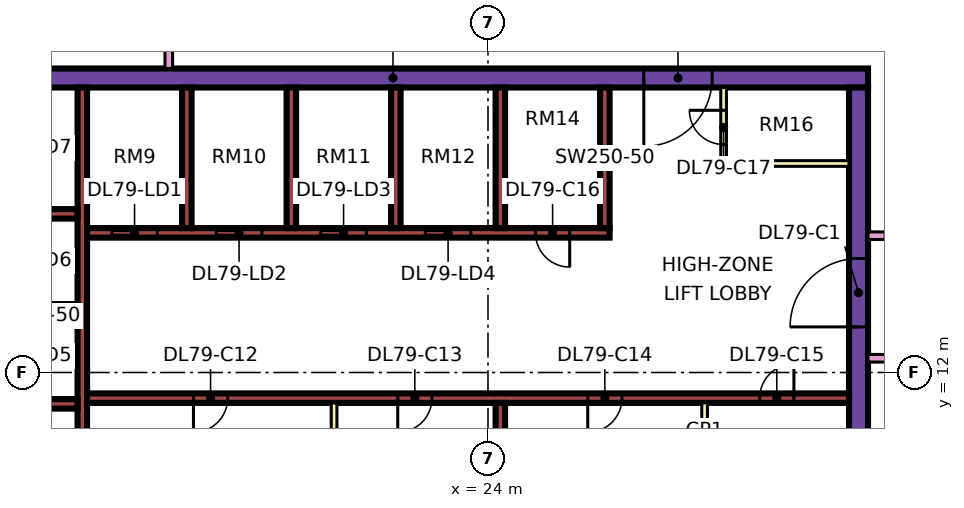
"""IFC4 building model, lengths in metres.
Left out: names, types, materials, properties, quantities, classifications, styles, units other than length and angle.
Written with IfcOpenShell. Run it as: python <this file> out.ifc"""

import sys

from ifc_helpers import new_model, si_unit, direction, frame, frame_2d, origin, place, context, subcontext, project, spatial, rectangle, extrude, element, fill, save


model = new_model("IFC4")
c1 = context("Model", 3, precision=1e-05, world=origin(), true_north=direction((0.0, 1.0)))
c2 = subcontext(c1, "Body", "Model", "MODEL_VIEW")
j1 = project(units=[si_unit("LENGTHUNIT", "METRE"), si_unit("PLANEANGLEUNIT", "RADIAN")], contexts=[c1])
p1 = place(None, origin())
s1 = spatial("IfcSite", under=j1, at=p1, CompositionType="ELEMENT")
p2 = place(p1, origin())
s2 = spatial("IfcBuilding", under=s1, at=p2, CompositionType="ELEMENT")
p3 = place(p2, frame((0.0, 0.0, 342.65)))
s3 = spatial("IfcBuildingStorey", under=s2, at=p3, CompositionType="ELEMENT", Elevation=342.65)
p4 = place(p3, frame((9.0, 19.75, 0.0), z_axis=(0.0, 0.0, 1.0), x_axis=(1.0, 0.0, 0.0)))
e1 = element("IfcWall", 1, at=p4, inside=s3, PredefinedType="SHEAR", context=c2, shape_type="SweptSolid", body=[
    extrude(rectangle(XDim=25.0, YDim=0.5, at=frame_2d((12.5, 0.0))), origin(), (0.0, 0.0, 1.0), 3.75),
])
p5 = place(p4, frame((19.1, 0.0, 0.0)))
e2 = element("IfcOpeningElement", 2, at=p5, cuts=e1, PredefinedType="OPENING", context=c2, shape_type="SweptSolid", body=[
    extrude(rectangle(XDim=1.8, YDim=2.4, at=frame_2d((0.9, 1.2))), frame((0.0, 0.26, 0.0), z_axis=(0.0, -1.0, 0.0), x_axis=(1.0, 0.0, 0.0)), (0.0, 0.0, 1.0), 0.52),
])
p6 = place(p3, frame((33.75, 7.5, 0.0), z_axis=(0.0, 0.0, 1.0), x_axis=(0.0, 1.0, 0.0)))
e3 = element("IfcWall", 3, at=p6, inside=s3, PredefinedType="SHEAR", context=c2, shape_type="SweptSolid", body=[
    extrude(rectangle(XDim=12.0, YDim=0.5, at=frame_2d((6.0, 0.0))), origin(), (0.0, 0.0, 1.0), 3.75),
])
p7 = place(p6, frame((5.7, 0.0, 0.0)))
e4 = element("IfcOpeningElement", 4, at=p7, cuts=e3, PredefinedType="OPENING", context=c2, shape_type="SweptSolid", body=[
    extrude(rectangle(XDim=1.8, YDim=2.4, at=frame_2d((0.9, 1.2))), frame((0.0, 0.26, 0.0), z_axis=(0.0, -1.0, 0.0), x_axis=(1.0, 0.0, 0.0)), (0.0, 0.0, 1.0), 0.52),
])
p8 = place(p3, frame((13.325, 7.5, 0.0), z_axis=(0.0, 0.0, 1.0), x_axis=(0.0, 1.0, 0.0)))
e5 = element("IfcWall", 5, at=p8, inside=s3, PredefinedType="SHEAR", context=c2, shape_type="SweptSolid", body=[
    extrude(rectangle(XDim=12.0, YDim=0.25, at=frame_2d((6.0, 0.0))), origin(), (0.0, 0.0, 1.0), 3.75),
])
p9 = place(p3, frame((13.45, 11.325, 0.0), z_axis=(0.0, 0.0, 1.0), x_axis=(1.0, 0.0, 0.0)))
e6 = element("IfcWall", 6, at=p9, inside=s3, PredefinedType="SHEAR", context=c2, shape_type="SweptSolid", body=[
    extrude(rectangle(XDim=20.05, YDim=0.25, at=frame_2d((10.025, 0.0))), origin(), (0.0, 0.0, 1.0), 3.75),
])
p10 = place(p9, frame((2.8, 0.0, 0.0)))
e7 = element("IfcOpeningElement", 7, at=p10, cuts=e6, PredefinedType="OPENING", context=c2, shape_type="SweptSolid", body=[
    extrude(rectangle(XDim=0.9, YDim=2.1, at=frame_2d((0.45, 1.05))), frame((0.0, 0.135, 0.0), z_axis=(0.0, -1.0, 0.0), x_axis=(1.0, 0.0, 0.0)), (0.0, 0.0, 1.0), 0.27),
])
p11 = place(p9, frame((8.175, 0.0, 0.0)))
e8 = element("IfcOpeningElement", 8, at=p11, cuts=e6, PredefinedType="OPENING", context=c2, shape_type="SweptSolid", body=[
    extrude(rectangle(XDim=0.9, YDim=2.1, at=frame_2d((0.45, 1.05))), frame((0.0, 0.135, 0.0), z_axis=(0.0, -1.0, 0.0), x_axis=(1.0, 0.0, 0.0)), (0.0, 0.0, 1.0), 0.27),
])
p12 = place(p9, frame((13.175, 0.0, 0.0)))
e9 = element("IfcOpeningElement", 9, at=p12, cuts=e6, PredefinedType="OPENING", context=c2, shape_type="SweptSolid", body=[
    extrude(rectangle(XDim=0.9, YDim=2.1, at=frame_2d((0.45, 1.05))), frame((0.0, 0.135, 0.0), z_axis=(0.0, -1.0, 0.0), x_axis=(1.0, 0.0, 0.0)), (0.0, 0.0, 1.0), 0.27),
])
p13 = place(p9, frame((17.7, 0.0, 0.0)))
e10 = element("IfcOpeningElement", 10, at=p13, cuts=e6, PredefinedType="OPENING", context=c2, shape_type="SweptSolid", body=[
    extrude(rectangle(XDim=0.9, YDim=2.1, at=frame_2d((0.45, 1.05))), frame((0.0, 0.135, 0.0), z_axis=(0.0, -1.0, 0.0), x_axis=(1.0, 0.0, 0.0)), (0.0, 0.0, 1.0), 0.27),
])
p14 = place(p3, frame((13.45, 15.675, 0.0), z_axis=(0.0, 0.0, 1.0), x_axis=(1.0, 0.0, 0.0)))
e11 = element("IfcWall", 11, at=p14, inside=s3, PredefinedType="SHEAR", context=c2, shape_type="SweptSolid", body=[
    extrude(rectangle(XDim=13.75, YDim=0.25, at=frame_2d((6.875, 0.0))), origin(), (0.0, 0.0, 1.0), 3.75),
])
p15 = place(p14, frame((0.65, 0.0, 0.0)))
e12 = element("IfcOpeningElement", 12, at=p15, cuts=e11, PredefinedType="OPENING", context=c2, shape_type="SweptSolid", body=[
    extrude(rectangle(XDim=1.2, YDim=2.2, at=frame_2d((0.6, 1.1))), frame((0.0, 0.135, 0.0), z_axis=(0.0, -1.0, 0.0), x_axis=(1.0, 0.0, 0.0)), (0.0, 0.0, 1.0), 0.27),
])
p16 = place(p14, frame((3.4, 0.0, 0.0)))
e13 = element("IfcOpeningElement", 13, at=p16, cuts=e11, PredefinedType="OPENING", context=c2, shape_type="SweptSolid", body=[
    extrude(rectangle(XDim=1.2, YDim=2.2, at=frame_2d((0.6, 1.1))), frame((0.0, 0.135, 0.0), z_axis=(0.0, -1.0, 0.0), x_axis=(1.0, 0.0, 0.0)), (0.0, 0.0, 1.0), 0.27),
])
p17 = place(p14, frame((6.15, 0.0, 0.0)))
e14 = element("IfcOpeningElement", 14, at=p17, cuts=e11, PredefinedType="OPENING", context=c2, shape_type="SweptSolid", body=[
    extrude(rectangle(XDim=1.2, YDim=2.2, at=frame_2d((0.6, 1.1))), frame((0.0, 0.135, 0.0), z_axis=(0.0, -1.0, 0.0), x_axis=(1.0, 0.0, 0.0)), (0.0, 0.0, 1.0), 0.27),
])
p18 = place(p14, frame((8.9, 0.0, 0.0)))
e15 = element("IfcOpeningElement", 15, at=p18, cuts=e11, PredefinedType="OPENING", context=c2, shape_type="SweptSolid", body=[
    extrude(rectangle(XDim=1.2, YDim=2.2, at=frame_2d((0.6, 1.1))), frame((0.0, 0.135, 0.0), z_axis=(0.0, -1.0, 0.0), x_axis=(1.0, 0.0, 0.0)), (0.0, 0.0, 1.0), 0.27),
])
p19 = place(p14, frame((11.8, 0.0, 0.0)))
e16 = element("IfcOpeningElement", 16, at=p19, cuts=e11, PredefinedType="OPENING", context=c2, shape_type="SweptSolid", body=[
    extrude(rectangle(XDim=0.9, YDim=2.1, at=frame_2d((0.45, 1.05))), frame((0.0, 0.135, 0.0), z_axis=(0.0, -1.0, 0.0), x_axis=(1.0, 0.0, 0.0)), (0.0, 0.0, 1.0), 0.27),
])
for number, where, z_axis, x_axis in (
    (17, (10.2, 11.175, 0.0), (0.0, 0.0, 1.0), (1.0, 0.0, 0.0)),
    (18, (10.2, 13.675, 0.0), (0.0, 0.0, 1.0), (1.0, 0.0, 0.0)),
    (19, (10.2, 16.175, 0.0), (0.0, 0.0, 1.0), (1.0, 0.0, 0.0)),
):
    element("IfcWall", number, at=place(p3, frame(where, z_axis=z_axis, x_axis=x_axis)), inside=s3, PredefinedType="SHEAR", context=c2, shape_type="SweptSolid", body=[
        extrude(rectangle(XDim=3.0, YDim=0.25, at=frame_2d((1.5, 0.0))), origin(), (0.0, 0.0, 1.0), 3.75),
    ])
for number, where, z_axis, x_axis in (
    (20, (24.325, 7.5, 0.0), (0.0, 0.0, 1.0), (0.0, 1.0, 0.0)),
    (21, (16.075, 15.8, 0.0), (0.0, 0.0, 1.0), (0.0, 1.0, 0.0)),
    (22, (18.825, 15.8, 0.0), (0.0, 0.0, 1.0), (0.0, 1.0, 0.0)),
    (23, (21.575, 15.8, 0.0), (0.0, 0.0, 1.0), (0.0, 1.0, 0.0)),
    (24, (24.325, 15.8, 0.0), (0.0, 0.0, 1.0), (0.0, 1.0, 0.0)),
    (25, (27.075, 15.8, 0.0), (0.0, 0.0, 1.0), (0.0, 1.0, 0.0)),
):
    element("IfcWall", number, at=place(p3, frame(where, z_axis=z_axis, x_axis=x_axis)), inside=s3, PredefinedType="SHEAR", context=c2, shape_type="SweptSolid", body=[
        extrude(rectangle(XDim=3.7, YDim=0.25, at=frame_2d((1.85, 0.0))), origin(), (0.0, 0.0, 1.0), 3.75),
    ])
p20 = place(p3, frame((-1.447, 12.553, 0.0), z_axis=(0.0, 0.0, 1.0), x_axis=(0.707106781187, -0.707106781187, 0.0)))
e26 = element("IfcWall", 26, at=p20, inside=s3, PredefinedType="SOLIDWALL", context=c2, shape_type="SweptSolid", body=[
    extrude(rectangle(XDim=19.799, YDim=0.15, at=frame_2d((9.899, 0.0))), origin(), (0.0, 0.0, 1.0), 3.35),
])
p21 = place(p20, frame((2.212, 0.0, 0.45)))
e27 = element("IfcOpeningElement", 27, at=p21, cuts=e26, PredefinedType="OPENING", context=c2, shape_type="SweptSolid", body=[
    extrude(rectangle(XDim=3.0, YDim=2.4, at=frame_2d((1.5, 1.2))), frame((0.0, 0.085, 0.0), z_axis=(0.0, -1.0, 0.0), x_axis=(1.0, 0.0, 0.0)), (0.0, 0.0, 1.0), 0.17),
])
p22 = place(p20, frame((10.216, 0.0, 0.45)))
e28 = element("IfcOpeningElement", 28, at=p22, cuts=e26, PredefinedType="OPENING", context=c2, shape_type="SweptSolid", body=[
    extrude(rectangle(XDim=3.0, YDim=2.4, at=frame_2d((1.5, 1.2))), frame((0.0, 0.085, 0.0), z_axis=(0.0, -1.0, 0.0), x_axis=(1.0, 0.0, 0.0)), (0.0, 0.0, 1.0), 0.17),
])
for number, where, z_axis, x_axis in (
    (29, (19.95, 7.5, 0.0), (0.0, 0.0, 1.0), (0.0, 1.0, 0.0)),
    (30, (29.7, 7.5, 0.0), (0.0, 0.0, 1.0), (0.0, 1.0, 0.0)),
):
    element("IfcWall", number, at=place(p3, frame(where, z_axis=z_axis, x_axis=x_axis)), inside=s3, PredefinedType="PARTITIONING", context=c2, shape_type="SweptSolid", body=[
        extrude(rectangle(XDim=3.7, YDim=0.15, at=frame_2d((1.85, 0.0))), origin(), (0.0, 0.0, 1.0), 3.35),
    ])
p23 = place(p3, frame((30.2, 17.5, 0.0), z_axis=(0.0, 0.0, 1.0), x_axis=(0.0, 1.0, 0.0)))
e31 = element("IfcWall", 31, at=p23, inside=s3, PredefinedType="PARTITIONING", context=c2, shape_type="SweptSolid", body=[
    extrude(rectangle(XDim=2.0, YDim=0.15, at=frame_2d((1.0, 0.0))), origin(), (0.0, 0.0, 1.0), 3.35),
])
p24 = place(p23, frame((0.5, 0.0, 0.0)))
e32 = element("IfcOpeningElement", 32, at=p24, cuts=e31, PredefinedType="OPENING", context=c2, shape_type="SweptSolid", body=[
    extrude(rectangle(XDim=0.9, YDim=2.1, at=frame_2d((0.45, 1.05))), frame((0.0, 0.085, 0.0), z_axis=(0.0, -1.0, 0.0), x_axis=(1.0, 0.0, 0.0)), (0.0, 0.0, 1.0), 0.17),
])
p25 = place(p3, frame((30.2, 17.5, 0.0), z_axis=(0.0, 0.0, 1.0), x_axis=(1.0, 0.0, 0.0)))
e33 = element("IfcWall", 33, at=p25, inside=s3, PredefinedType="PARTITIONING", context=c2, shape_type="SweptSolid", body=[
    extrude(rectangle(XDim=3.3, YDim=0.15, at=frame_2d((1.65, 0.0))), origin(), (0.0, 0.0, 1.0), 3.35),
])
p26 = place(p3, frame((15.6, 20.0, 0.0), z_axis=(0.0, 0.0, 1.0), x_axis=(0.0, 1.0, 0.0)))
e34 = element("IfcWall", 34, at=p26, inside=s3, PredefinedType="PARTITIONING", context=c2, shape_type="SweptSolid", body=[
    extrude(rectangle(XDim=27.775, YDim=0.2, at=frame_2d((13.887, 0.0))), origin(), (0.0, 0.0, 1.0), 3.35),
])
p27 = place(p26, frame((6.25, 0.0, 0.0)))
e35 = element("IfcOpeningElement", 35, at=p27, cuts=e34, PredefinedType="OPENING", context=c2, shape_type="SweptSolid", body=[
    extrude(rectangle(XDim=1.6, YDim=2.1, at=frame_2d((0.8, 1.05))), frame((0.0, 0.11, 0.0), z_axis=(0.0, -1.0, 0.0), x_axis=(1.0, 0.0, 0.0)), (0.0, 0.0, 1.0), 0.22),
])
p28 = place(p26, frame((12.55, 0.0, 0.0)))
e36 = element("IfcOpeningElement", 36, at=p28, cuts=e34, PredefinedType="OPENING", context=c2, shape_type="SweptSolid", body=[
    extrude(rectangle(XDim=1.0, YDim=2.1, at=frame_2d((0.5, 1.05))), frame((0.0, 0.11, 0.0), z_axis=(0.0, -1.0, 0.0), x_axis=(1.0, 0.0, 0.0)), (0.0, 0.0, 1.0), 0.22),
])
p29 = place(p26, frame((22.9, 0.0, 0.0)))
e37 = element("IfcOpeningElement", 37, at=p29, cuts=e34, PredefinedType="OPENING", context=c2, shape_type="SweptSolid", body=[
    extrude(rectangle(XDim=1.0, YDim=2.1, at=frame_2d((0.5, 1.05))), frame((0.0, 0.11, 0.0), z_axis=(0.0, -1.0, 0.0), x_axis=(1.0, 0.0, 0.0)), (0.0, 0.0, 1.0), 0.22),
])
p30 = place(p26, frame((1.15, 0.0, 0.0)))
e38 = element("IfcOpeningElement", 38, at=p30, cuts=e34, PredefinedType="OPENING", context=c2, shape_type="SweptSolid", body=[
    extrude(rectangle(XDim=1.8, YDim=2.1, at=frame_2d((0.9, 1.05))), frame((0.0, 0.11, 0.0), z_axis=(0.0, -1.0, 0.0), x_axis=(1.0, 0.0, 0.0)), (0.0, 0.0, 1.0), 0.22),
])
p31 = place(p26, frame((25.9, 0.0, 0.0)))
e39 = element("IfcOpeningElement", 39, at=p31, cuts=e34, PredefinedType="OPENING", context=c2, shape_type="SweptSolid", body=[
    extrude(rectangle(XDim=1.0, YDim=2.1, at=frame_2d((0.5, 1.05))), frame((0.0, 0.11, 0.0), z_axis=(0.0, -1.0, 0.0), x_axis=(1.0, 0.0, 0.0)), (0.0, 0.0, 1.0), 0.22),
])
p32 = place(p3, frame((34.0, 12.375, 0.0), z_axis=(0.0, 0.0, 1.0), x_axis=(1.0, 0.0, 0.0)))
e40 = element("IfcWall", 40, at=p32, inside=s3, PredefinedType="PARTITIONING", context=c2, shape_type="SweptSolid", body=[
    extrude(rectangle(XDim=2.376, YDim=0.2, at=frame_2d((1.188, 0.0))), origin(), (0.0, 0.0, 1.0), 3.35),
])
p33 = place(p3, frame((34.0, 15.6, 0.0), z_axis=(0.0, 0.0, 1.0), x_axis=(1.0, 0.0, 0.0)))
e41 = element("IfcWall", 41, at=p33, inside=s3, PredefinedType="PARTITIONING", context=c2, shape_type="SweptSolid", body=[
    extrude(rectangle(XDim=10.35, YDim=0.2, at=frame_2d((5.175, 0.0))), origin(), (0.0, 0.0, 1.0), 3.35),
])
p34 = place(p33, frame((5.6, 0.0, 0.0)))
e42 = element("IfcOpeningElement", 42, at=p34, cuts=e41, PredefinedType="OPENING", context=c2, shape_type="SweptSolid", body=[
    extrude(rectangle(XDim=1.0, YDim=2.1, at=frame_2d((0.5, 1.05))), frame((0.0, 0.11, 0.0), z_axis=(0.0, -1.0, 0.0), x_axis=(1.0, 0.0, 0.0)), (0.0, 0.0, 1.0), 0.22),
])
p35 = place(p33, frame((0.45, 0.0, 0.0)))
e43 = element("IfcOpeningElement", 43, at=p35, cuts=e41, PredefinedType="OPENING", context=c2, shape_type="SweptSolid", body=[
    extrude(rectangle(XDim=1.2, YDim=2.1, at=frame_2d((0.6, 1.05))), frame((0.0, 0.11, 0.0), z_axis=(0.0, -1.0, 0.0), x_axis=(1.0, 0.0, 0.0)), (0.0, 0.0, 1.0), 0.22),
])
p36 = place(p15, origin())
e44 = element("IfcDoor", 44, at=p36, inside=s3, OperationType="DOUBLE_DOOR_SLIDING", PredefinedType="DOOR", context=c2, shape_type="SweptSolid", body=[
    extrude(rectangle(XDim=1.2, YDim=2.2, at=frame_2d((0.6, 1.1))), frame((0.0, 0.025, 0.0), z_axis=(0.0, -1.0, 0.0), x_axis=(1.0, 0.0, 0.0)), (0.0, 0.0, 1.0), 0.05),
])
fill(e12, e44)
p37 = place(p16, origin())
e45 = element("IfcDoor", 45, at=p37, inside=s3, OperationType="DOUBLE_DOOR_SLIDING", PredefinedType="DOOR", context=c2, shape_type="SweptSolid", body=[
    extrude(rectangle(XDim=1.2, YDim=2.2, at=frame_2d((0.6, 1.1))), frame((0.0, 0.025, 0.0), z_axis=(0.0, -1.0, 0.0), x_axis=(1.0, 0.0, 0.0)), (0.0, 0.0, 1.0), 0.05),
])
fill(e13, e45)
p38 = place(p17, origin())
e46 = element("IfcDoor", 46, at=p38, inside=s3, OperationType="DOUBLE_DOOR_SLIDING", PredefinedType="DOOR", context=c2, shape_type="SweptSolid", body=[
    extrude(rectangle(XDim=1.2, YDim=2.2, at=frame_2d((0.6, 1.1))), frame((0.0, 0.025, 0.0), z_axis=(0.0, -1.0, 0.0), x_axis=(1.0, 0.0, 0.0)), (0.0, 0.0, 1.0), 0.05),
])
fill(e14, e46)
p39 = place(p18, origin())
e47 = element("IfcDoor", 47, at=p39, inside=s3, OperationType="DOUBLE_DOOR_SLIDING", PredefinedType="DOOR", context=c2, shape_type="SweptSolid", body=[
    extrude(rectangle(XDim=1.2, YDim=2.2, at=frame_2d((0.6, 1.1))), frame((0.0, 0.025, 0.0), z_axis=(0.0, -1.0, 0.0), x_axis=(1.0, 0.0, 0.0)), (0.0, 0.0, 1.0), 0.05),
])
fill(e15, e47)
p40 = place(p7, origin())
e48 = element("IfcDoor", 48, at=p40, inside=s3, OperationType="DOUBLE_DOOR_SINGLE_SWING", PredefinedType="DOOR", context=c2, shape_type="SweptSolid", body=[
    extrude(rectangle(XDim=1.8, YDim=2.4, at=frame_2d((0.9, 1.2))), frame((0.0, 0.025, 0.0), z_axis=(0.0, -1.0, 0.0), x_axis=(1.0, 0.0, 0.0)), (0.0, 0.0, 1.0), 0.05),
])
fill(e4, e48)
p41 = place(p5, frame((1.8, 0.0, 0.0), z_axis=(0.0, 0.0, 1.0), x_axis=(-1.0, 0.0, 0.0)))
e49 = element("IfcDoor", 49, at=p41, inside=s3, OperationType="DOUBLE_DOOR_SINGLE_SWING", PredefinedType="DOOR", context=c2, shape_type="SweptSolid", body=[
    extrude(rectangle(XDim=1.8, YDim=2.4, at=frame_2d((0.9, 1.2))), frame((0.0, 0.025, 0.0), z_axis=(0.0, -1.0, 0.0), x_axis=(1.0, 0.0, 0.0)), (0.0, 0.0, 1.0), 0.05),
])
fill(e2, e49)
p42 = place(p10, frame((0.9, 0.0, 0.0), z_axis=(0.0, 0.0, 1.0), x_axis=(-1.0, 0.0, 0.0)))
e50 = element("IfcDoor", 50, at=p42, inside=s3, OperationType="SINGLE_SWING_LEFT", PredefinedType="DOOR", context=c2, shape_type="SweptSolid", body=[
    extrude(rectangle(XDim=0.9, YDim=2.1, at=frame_2d((0.45, 1.05))), frame((0.0, 0.025, 0.0), z_axis=(0.0, -1.0, 0.0), x_axis=(1.0, 0.0, 0.0)), (0.0, 0.0, 1.0), 0.05),
])
fill(e7, e50)
p43 = place(p11, frame((0.9, 0.0, 0.0), z_axis=(0.0, 0.0, 1.0), x_axis=(-1.0, 0.0, 0.0)))
e51 = element("IfcDoor", 51, at=p43, inside=s3, OperationType="SINGLE_SWING_LEFT", PredefinedType="DOOR", context=c2, shape_type="SweptSolid", body=[
    extrude(rectangle(XDim=0.9, YDim=2.1, at=frame_2d((0.45, 1.05))), frame((0.0, 0.025, 0.0), z_axis=(0.0, -1.0, 0.0), x_axis=(1.0, 0.0, 0.0)), (0.0, 0.0, 1.0), 0.05),
])
fill(e8, e51)
p44 = place(p12, frame((0.9, 0.0, 0.0), z_axis=(0.0, 0.0, 1.0), x_axis=(-1.0, 0.0, 0.0)))
e52 = element("IfcDoor", 52, at=p44, inside=s3, OperationType="SINGLE_SWING_LEFT", PredefinedType="DOOR", context=c2, shape_type="SweptSolid", body=[
    extrude(rectangle(XDim=0.9, YDim=2.1, at=frame_2d((0.45, 1.05))), frame((0.0, 0.025, 0.0), z_axis=(0.0, -1.0, 0.0), x_axis=(1.0, 0.0, 0.0)), (0.0, 0.0, 1.0), 0.05),
])
fill(e9, e52)
p45 = place(p13, frame((0.9, 0.0, 0.0), z_axis=(0.0, 0.0, 1.0), x_axis=(-1.0, 0.0, 0.0)))
e53 = element("IfcDoor", 53, at=p45, inside=s3, OperationType="SINGLE_SWING_RIGHT", PredefinedType="DOOR", context=c2, shape_type="SweptSolid", body=[
    extrude(rectangle(XDim=0.9, YDim=2.1, at=frame_2d((0.45, 1.05))), frame((0.0, 0.025, 0.0), z_axis=(0.0, -1.0, 0.0), x_axis=(1.0, 0.0, 0.0)), (0.0, 0.0, 1.0), 0.05),
])
fill(e10, e53)
p46 = place(p19, origin())
e54 = element("IfcDoor", 54, at=p46, inside=s3, OperationType="SINGLE_SWING_RIGHT", PredefinedType="DOOR", context=c2, shape_type="SweptSolid", body=[
    extrude(rectangle(XDim=0.9, YDim=2.1, at=frame_2d((0.45, 1.05))), frame((0.0, 0.025, 0.0), z_axis=(0.0, -1.0, 0.0), x_axis=(1.0, 0.0, 0.0)), (0.0, 0.0, 1.0), 0.05),
])
fill(e16, e54)
p47 = place(p24, frame((0.9, 0.0, 0.0), z_axis=(0.0, 0.0, 1.0), x_axis=(-1.0, 0.0, 0.0)))
e55 = element("IfcDoor", 55, at=p47, inside=s3, OperationType="SINGLE_SWING_RIGHT", PredefinedType="DOOR", context=c2, shape_type="SweptSolid", body=[
    extrude(rectangle(XDim=0.9, YDim=2.1, at=frame_2d((0.45, 1.05))), frame((0.0, 0.025, 0.0), z_axis=(0.0, -1.0, 0.0), x_axis=(1.0, 0.0, 0.0)), (0.0, 0.0, 1.0), 0.05),
])
fill(e32, e55)
save(model, sys.argv[1])
